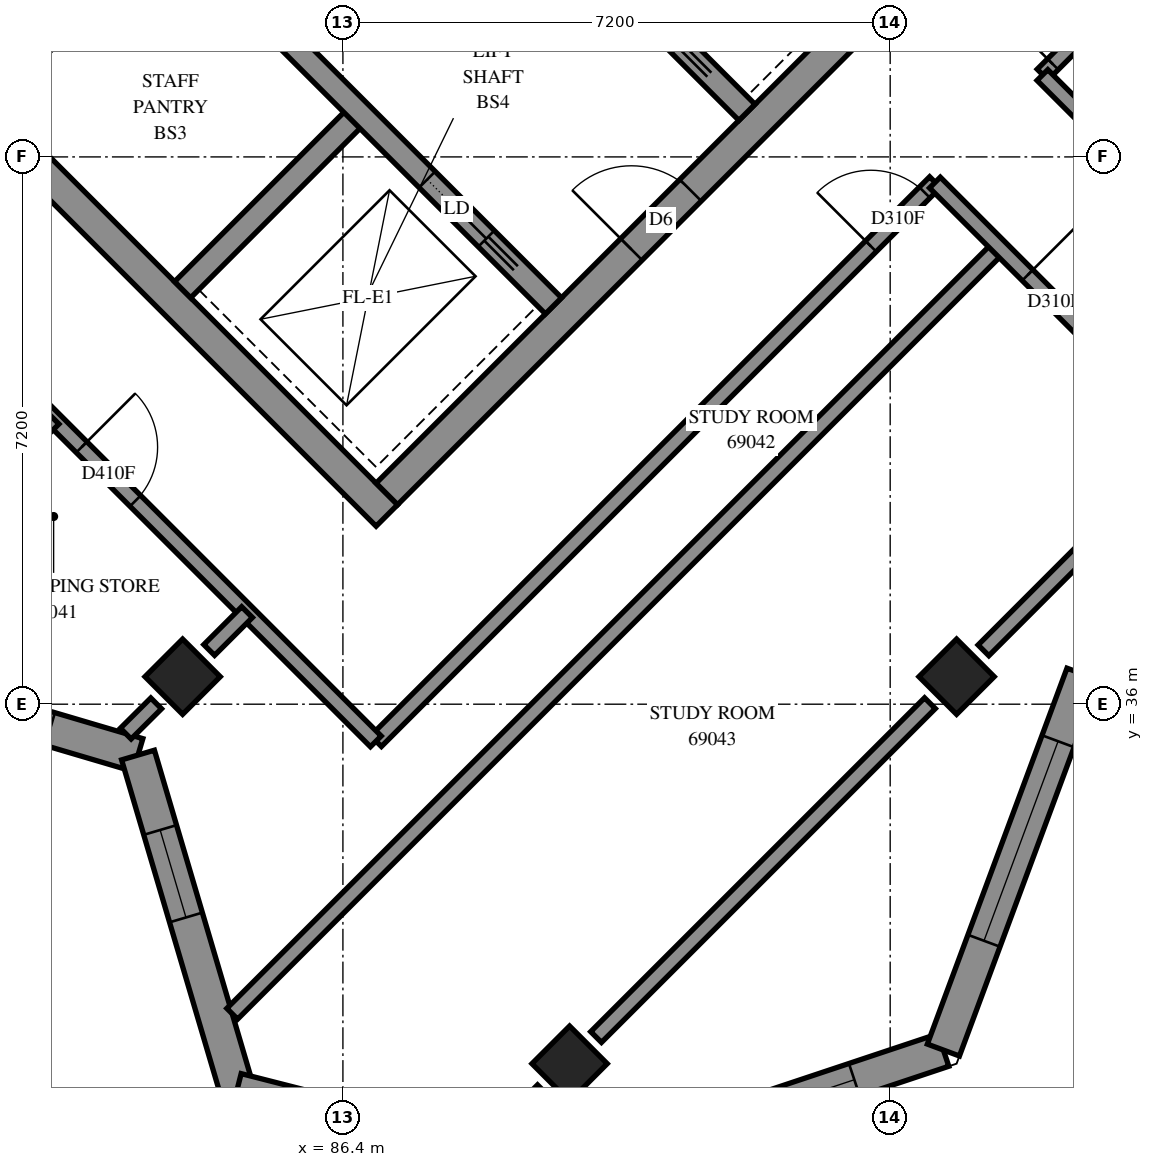
"""IFC4 building model, lengths in metres.
Left out: names, types, materials, properties, quantities, classifications, styles, units other than length and angle.
Written with IfcOpenShell. Run it as: python <this file> out.ifc"""

import sys

from ifc_helpers import new_model, si_unit, direction, frame, frame_2d, origin, origin_2d, place, context, subcontext, project, spatial, polyline, rectangle, outline, extrude, element, fill, save


model = new_model("IFC4")
c1 = context("Model", 3, precision=1e-05, world=origin(), true_north=direction((0.0, 1.0)))
c2 = subcontext(c1, "Body", "Model", "MODEL_VIEW")
j1 = project(units=[si_unit("LENGTHUNIT", "METRE"), si_unit("PLANEANGLEUNIT", "RADIAN")], contexts=[c1])
p1 = place(None, origin())
s1 = spatial("IfcSite", under=j1, at=p1, CompositionType="ELEMENT")
p2 = place(p1, origin())
s2 = spatial("IfcBuilding", under=s1, at=p2, CompositionType="ELEMENT")
p3 = place(p2, frame((0.0, 0.0, 254.0)))
s3 = spatial("IfcBuildingStorey", under=s2, at=p3, CompositionType="ELEMENT", Elevation=254.0)
for number, where, z_axis, x_axis in (
    (1, (84.291, 36.362, 0.0), (0.0, 0.0, 1.0), (0.707, -0.707, 0.0)),
    (2, (94.474, 36.362, 0.0), (0.0, 0.0, 1.0), (0.707, -0.707, 0.0)),
    (3, (89.382, 31.271, 0.0), (0.0, 0.0, 1.0), (0.707, -0.707, 0.0)),
):
    element("IfcColumn", number, at=place(p3, frame(where, z_axis=z_axis, x_axis=x_axis)), inside=s3, PredefinedType="COLUMN", context=c2, shape_type="SweptSolid", body=[
        extrude(rectangle(XDim=0.7, YDim=0.7, at=origin_2d()), origin(), (0.0, 0.0, 1.0), 3.1),
    ])
p4 = place(p3, frame((76.23, 49.231, -0.3), z_axis=(0.0, 0.0, 1.0), x_axis=(0.7071034917, -0.7071100706, 0.0)))
e4 = element("IfcWall", 4, at=p4, inside=s3, PredefinedType="SHEAR", context=c2, shape_type="SweptSolid", body=[
    extrude(rectangle(XDim=15.2, YDim=0.4, at=frame_2d((7.6, 0.0))), origin(), (0.0, 0.0, 1.0), 2.7),
])
p5 = place(p3, frame((86.978, 38.766, -0.3), z_axis=(0.0, 0.0, 1.0), x_axis=(0.7071067812, 0.7071067812, 0.0)))
e5 = element("IfcWall", 5, at=p5, inside=s3, PredefinedType="SHEAR", context=c2, shape_type="SweptSolid", body=[
    extrude(rectangle(XDim=14.4, YDim=0.4, at=frame_2d((7.2, 0.0))), origin(), (0.0, 0.0, 1.0), 2.7),
])
p6 = place(p5, frame((4.55, 0.0, 0.3)))
e6 = element("IfcOpeningElement", 6, at=p6, cuts=e5, PredefinedType="OPENING", context=c2, shape_type="SweptSolid", body=[
    extrude(rectangle(XDim=1.1, YDim=2.1, at=frame_2d((0.55, 1.05))), frame((0.0, 0.21, 0.0), z_axis=(0.0, -1.0, 0.0), x_axis=(1.0, 0.0, 0.0)), (0.0, 0.0, 1.0), 0.42),
])
p7 = place(p5, frame((11.35, 0.0, 0.3)))
e7 = element("IfcOpeningElement", 7, at=p7, cuts=e5, PredefinedType="OPENING", context=c2, shape_type="SweptSolid", body=[
    extrude(rectangle(XDim=1.1, YDim=2.1, at=frame_2d((0.55, 1.05))), frame((0.0, 0.21, 0.0), z_axis=(0.0, -1.0, 0.0), x_axis=(1.0, 0.0, 0.0)), (0.0, 0.0, 1.0), 0.42),
])
for number, where, z_axis, x_axis in (
    (8, (81.746, 43.999, 0.0), (0.0, 0.0, 1.0), (0.707, 0.707, 0.0)),
    (9, (84.291, 41.453, 0.0), (0.0, 0.0, 1.0), (0.707, 0.707, 0.0)),
):
    element("IfcWall", number, at=place(p3, frame(where, z_axis=z_axis, x_axis=x_axis)), inside=s3, PredefinedType="SOLIDWALL", context=c2, shape_type="SweptSolid", body=[
        extrude(rectangle(XDim=3.3, YDim=0.3, at=frame_2d((1.65, 0.0))), origin(), (0.0, 0.0, 1.0), 3.1),
    ])
p8 = place(p3, frame((78.988, 51.423, 0.0), z_axis=(0.0, 0.0, 1.0), x_axis=(0.7071067812, -0.7071067812, 0.0)))
e10 = element("IfcWall", 10, at=p8, inside=s3, PredefinedType="SOLIDWALL", context=c2, shape_type="SweptSolid", body=[
    extrude(rectangle(XDim=14.4, YDim=0.3, at=frame_2d((7.2, 0.0))), origin(), (0.0, 0.0, 1.0), 3.1),
])
p9 = place(p8, frame((1.35, 0.0, 0.0)))
e11 = element("IfcOpeningElement", 11, at=p9, cuts=e10, PredefinedType="OPENING", context=c2, shape_type="SweptSolid", body=[
    extrude(rectangle(XDim=0.9, YDim=2.1, at=frame_2d((0.45, 1.05))), frame((0.0, 0.16, 0.0), z_axis=(0.0, -1.0, 0.0), x_axis=(1.0, 0.0, 0.0)), (0.0, 0.0, 1.0), 0.32),
])
p10 = place(p8, frame((4.95, 0.0, 0.0)))
e12 = element("IfcOpeningElement", 12, at=p10, cuts=e10, PredefinedType="OPENING", context=c2, shape_type="SweptSolid", body=[
    extrude(rectangle(XDim=0.9, YDim=2.1, at=frame_2d((0.45, 1.05))), frame((0.0, 0.16, 0.0), z_axis=(0.0, -1.0, 0.0), x_axis=(1.0, 0.0, 0.0)), (0.0, 0.0, 1.0), 0.32),
])
p11 = place(p8, frame((8.55, 0.0, 0.0)))
e13 = element("IfcOpeningElement", 13, at=p11, cuts=e10, PredefinedType="OPENING", context=c2, shape_type="SweptSolid", body=[
    extrude(rectangle(XDim=0.9, YDim=2.1, at=frame_2d((0.45, 1.05))), frame((0.0, 0.16, 0.0), z_axis=(0.0, -1.0, 0.0), x_axis=(1.0, 0.0, 0.0)), (0.0, 0.0, 1.0), 0.32),
])
p12 = place(p8, frame((12.05, 0.0, 0.0)))
e14 = element("IfcOpeningElement", 14, at=p12, cuts=e10, PredefinedType="OPENING", context=c2, shape_type="SweptSolid", body=[
    extrude(rectangle(XDim=1.1, YDim=2.1, at=frame_2d((0.55, 1.05))), frame((0.0, 0.16, 0.0), z_axis=(0.0, -1.0, 0.0), x_axis=(1.0, 0.0, 0.0)), (0.0, 0.0, 1.0), 0.32),
])
p13 = place(p3, frame((81.534, 53.969, 0.0), z_axis=(0.0, 0.0, 1.0), x_axis=(0.707103309, -0.7071102534, 0.0)))
e15 = element("IfcWall", 15, at=p13, inside=s3, PredefinedType="SOLIDWALL", context=c2, shape_type="SweptSolid", body=[
    extrude(rectangle(XDim=14.4, YDim=0.3, at=frame_2d((7.2, 0.0))), origin(), (0.0, 0.0, 1.0), 3.1),
])
p14 = place(p13, frame((8.55, 0.0, 0.0)))
e16 = element("IfcOpeningElement", 16, at=p14, cuts=e15, PredefinedType="OPENING", context=c2, shape_type="SweptSolid", body=[
    extrude(rectangle(XDim=0.9, YDim=2.1, at=frame_2d((0.45, 1.05))), frame((0.0, 0.16, 0.0), z_axis=(0.0, -1.0, 0.0), x_axis=(1.0, 0.0, 0.0)), (0.0, 0.0, 1.0), 0.32),
])
p15 = place(p13, frame((1.25, 0.0, 0.0)))
e17 = element("IfcOpeningElement", 17, at=p15, cuts=e15, PredefinedType="OPENING", context=c2, shape_type="SweptSolid", body=[
    extrude(rectangle(XDim=1.1, YDim=2.1, at=frame_2d((0.55, 1.05))), frame((0.0, 0.16, 0.0), z_axis=(0.0, -1.0, 0.0), x_axis=(1.0, 0.0, 0.0)), (0.0, 0.0, 1.0), 0.32),
])
p16 = place(p13, frame((4.85, 0.0, 0.0)))
e18 = element("IfcOpeningElement", 18, at=p16, cuts=e15, PredefinedType="OPENING", context=c2, shape_type="SweptSolid", body=[
    extrude(rectangle(XDim=1.1, YDim=2.1, at=frame_2d((0.55, 1.05))), frame((0.0, 0.16, 0.0), z_axis=(0.0, -1.0, 0.0), x_axis=(1.0, 0.0, 0.0)), (0.0, 0.0, 1.0), 0.32),
])
p17 = place(p13, frame((12.05, 0.0, 0.0)))
e19 = element("IfcOpeningElement", 19, at=p17, cuts=e15, PredefinedType="OPENING", context=c2, shape_type="SweptSolid", body=[
    extrude(rectangle(XDim=1.1, YDim=2.1, at=frame_2d((0.55, 1.05))), frame((0.0, 0.16, 0.0), z_axis=(0.0, -1.0, 0.0), x_axis=(1.0, 0.0, 0.0)), (0.0, 0.0, 1.0), 0.32),
])
p18 = place(p3, frame((89.374, 29.808, 0.0), z_axis=(0.0, 0.0, 1.0), x_axis=(0.9486871496, 0.3162162112, 0.0)))
e20 = element("IfcWall", 20, at=p18, inside=s3, PredefinedType="SOLIDWALL", context=c2, shape_type="SweptSolid", body=[
    extrude(outline(polyline([(-0.066, -0.225), (5.301, -0.225), (5.085, 0.225), (0.066, 0.225), (-0.066, -0.225)])), origin(), (0.0, 0.0, 1.0), 3.1),
])
p19 = place(p18, frame((1.157, 0.0, 0.45)))
e21 = element("IfcOpeningElement", 21, at=p19, cuts=e20, PredefinedType="OPENING", context=c2, shape_type="SweptSolid", body=[
    extrude(rectangle(XDim=2.8, YDim=2.55, at=frame_2d((1.4, 1.275))), frame((0.0, 0.235, 0.0), z_axis=(0.0, -1.0, 0.0), x_axis=(1.0, 0.0, 0.0)), (0.0, 0.0, 1.0), 0.47),
])
p20 = place(p3, frame((94.3, 31.45, 0.0), z_axis=(0.0, 0.0, 1.0), x_axis=(0.3481927166, 0.9374229739, 0.0)))
e22 = element("IfcWall", 22, at=p20, inside=s3, PredefinedType="SOLIDWALL", context=c2, shape_type="SweptSolid", body=[
    extrude(outline(polyline([(-0.108, -0.225), (5.172, -0.225), (5.379, 0.225), (0.108, 0.225), (-0.108, -0.225)])), origin(), (0.0, 0.0, 1.0), 3.1),
])
p21 = place(p20, frame((1.534, 0.0, 0.45)))
e23 = element("IfcOpeningElement", 23, at=p21, cuts=e22, PredefinedType="OPENING", context=c2, shape_type="SweptSolid", body=[
    extrude(rectangle(XDim=2.8, YDim=2.55, at=frame_2d((1.4, 1.275))), frame((0.0, 0.235, 0.0), z_axis=(0.0, -1.0, 0.0), x_axis=(1.0, 0.0, 0.0)), (0.0, 0.0, 1.0), 0.47),
])
p22 = place(p3, frame((96.137, 36.395, 0.0), z_axis=(0.0, 0.0, 1.0), x_axis=(0.937429161, 0.3481760591, 0.0)))
e24 = element("IfcWall", 24, at=p22, inside=s3, PredefinedType="SOLIDWALL", context=c2, shape_type="SweptSolid", body=[
    extrude(outline(polyline([(0.103, -0.225), (5.383, -0.225), (5.168, 0.225), (-0.103, 0.225), (0.103, -0.225)])), origin(), (0.0, 0.0, 1.0), 3.1),
])
p23 = place(p22, frame((1.651, 0.0, 0.45)))
e25 = element("IfcOpeningElement", 25, at=p23, cuts=e24, PredefinedType="OPENING", context=c2, shape_type="SweptSolid", body=[
    extrude(rectangle(XDim=2.8, YDim=2.55, at=frame_2d((1.4, 1.275))), frame((0.0, 0.235, 0.0), z_axis=(0.0, -1.0, 0.0), x_axis=(1.0, 0.0, 0.0)), (0.0, 0.0, 1.0), 0.47),
])
p24 = place(p3, frame((79.295, 36.633, 0.0), z_axis=(0.0, 0.0, 1.0), x_axis=(0.959077868, -0.2831424432, 0.0)))
e26 = element("IfcWall", 26, at=p24, inside=s3, PredefinedType="SOLIDWALL", context=c2, shape_type="SweptSolid", body=[
    extrude(outline(polyline([(-0.128, -0.225), (4.475, -0.225), (4.72, 0.225), (0.128, 0.225), (-0.128, -0.225)])), origin(), (0.0, 0.0, 1.0), 3.1),
])
p25 = place(p24, frame((0.591, 0.0, 0.45)))
e27 = element("IfcOpeningElement", 27, at=p25, cuts=e26, PredefinedType="OPENING", context=c2, shape_type="SweptSolid", body=[
    extrude(rectangle(XDim=2.8, YDim=2.55, at=frame_2d((1.4, 1.275))), frame((0.0, 0.235, 0.0), z_axis=(0.0, -1.0, 0.0), x_axis=(1.0, 0.0, 0.0)), (0.0, 0.0, 1.0), 0.47),
])
p26 = place(p3, frame((83.704, 35.331, 0.0), z_axis=(0.0, 0.0, 1.0), x_axis=(0.2831424432, -0.959077868, 0.0)))
e28 = element("IfcWall", 28, at=p26, inside=s3, PredefinedType="SOLIDWALL", context=c2, shape_type="SweptSolid", body=[
    extrude(outline(polyline([(0.122, -0.225), (4.725, -0.225), (4.469, 0.225), (-0.122, 0.225), (0.122, -0.225)])), origin(), (0.0, 0.0, 1.0), 3.1),
])
p27 = place(p26, frame((1.028, 0.0, 0.45)))
e29 = element("IfcOpeningElement", 29, at=p27, cuts=e28, PredefinedType="OPENING", context=c2, shape_type="SweptSolid", body=[
    extrude(rectangle(XDim=1.2, YDim=2.55, at=frame_2d((0.6, 1.275))), frame((0.0, 0.235, 0.0), z_axis=(0.0, -1.0, 0.0), x_axis=(1.0, 0.0, 0.0)), (0.0, 0.0, 1.0), 0.47),
])
p28 = place(p3, frame((85.006, 30.922, 0.0), z_axis=(0.0, 0.0, 1.0), x_axis=(0.9689925633, -0.2470898869, 0.0)))
e30 = element("IfcWall", 30, at=p28, inside=s3, PredefinedType="SOLIDWALL", context=c2, shape_type="SweptSolid", body=[
    extrude(outline(polyline([(-0.128, -0.225), (4.574, -0.225), (4.442, 0.225), (0.128, 0.225), (-0.128, -0.225)])), origin(), (0.0, 0.0, 1.0), 3.1),
])
p29 = place(p28, frame((2.14, 0.0, 0.45)))
e31 = element("IfcOpeningElement", 31, at=p29, cuts=e30, PredefinedType="OPENING", context=c2, shape_type="SweptSolid", body=[
    extrude(rectangle(XDim=1.2, YDim=2.55, at=frame_2d((0.6, 1.275))), frame((0.0, 0.235, 0.0), z_axis=(0.0, -1.0, 0.0), x_axis=(1.0, 0.0, 0.0)), (0.0, 0.0, 1.0), 0.47),
])
p30 = place(p3, frame((84.944, 31.927, 0.0), z_axis=(0.0, 0.0, 1.0), x_axis=(0.7071768334, 0.7070367221, 0.0)))
e32 = element("IfcWall", 32, at=p30, inside=s3, PredefinedType="PARTITIONING", context=c2, shape_type="SweptSolid", body=[
    extrude(rectangle(XDim=14.274, YDim=0.2, at=frame_2d((7.137, 0.0))), origin(), (0.0, 0.0, 1.0), 3.1),
])
p31 = place(p3, frame((86.836, 35.514, 0.0), z_axis=(0.0, 0.0, 1.0), x_axis=(0.7071067812, 0.7071067812, 0.0)))
e33 = element("IfcWall", 33, at=p31, inside=s3, PredefinedType="PARTITIONING", context=c2, shape_type="SweptSolid", body=[
    extrude(rectangle(XDim=10.4, YDim=0.2, at=frame_2d((5.2, 0.0))), origin(), (0.0, 0.0, 1.0), 3.1),
])
p32 = place(p31, frame((9.207, 0.0, 0.0)))
e34 = element("IfcOpeningElement", 34, at=p32, cuts=e33, PredefinedType="OPENING", context=c2, shape_type="SweptSolid", body=[
    extrude(rectangle(XDim=1.0, YDim=2.1, at=frame_2d((0.5, 1.05))), frame((0.0, 0.11, 0.0), z_axis=(0.0, -1.0, 0.0), x_axis=(1.0, 0.0, 0.0)), (0.0, 0.0, 1.0), 0.22),
])
p33 = place(p3, frame((80.747, 41.597, 0.0), z_axis=(0.0, 0.0, 1.0), x_axis=(0.7071067812, -0.7071067812, 0.0)))
e35 = element("IfcWall", 35, at=p33, inside=s3, PredefinedType="PARTITIONING", context=c2, shape_type="SweptSolid", body=[
    extrude(rectangle(XDim=8.607, YDim=0.2, at=frame_2d((4.303, 0.0))), origin(), (0.0, 0.0, 1.0), 3.1),
])
p34 = place(p33, frame((0.195, 0.0, 0.0)))
e36 = element("IfcOpeningElement", 36, at=p34, cuts=e35, PredefinedType="OPENING", context=c2, shape_type="SweptSolid", body=[
    extrude(rectangle(XDim=1.0, YDim=2.1, at=frame_2d((0.5, 1.05))), frame((0.0, 0.11, 0.0), z_axis=(0.0, -1.0, 0.0), x_axis=(1.0, 0.0, 0.0)), (0.0, 0.0, 1.0), 0.22),
])
p35 = place(p33, frame((3.133, 0.0, 0.0)))
e37 = element("IfcOpeningElement", 37, at=p35, cuts=e35, PredefinedType="OPENING", context=c2, shape_type="SweptSolid", body=[
    extrude(rectangle(XDim=1.0, YDim=2.1, at=frame_2d((0.5, 1.05))), frame((0.0, 0.11, 0.0), z_axis=(0.0, -1.0, 0.0), x_axis=(1.0, 0.0, 0.0)), (0.0, 0.0, 1.0), 0.22),
])
p36 = place(p3, frame((95.605, 44.283, 0.0), z_axis=(0.0, 0.0, 1.0), x_axis=(0.7071067812, 0.7071067812, 0.0)))
e38 = element("IfcWall", 38, at=p36, inside=s3, PredefinedType="PARTITIONING", context=c2, shape_type="SweptSolid", body=[
    extrude(rectangle(XDim=6.8, YDim=0.2, at=frame_2d((3.4, 0.0))), origin(), (0.0, 0.0, 1.0), 3.1),
])
p37 = place(p36, frame((0.193, 0.0, 0.0)))
e39 = element("IfcOpeningElement", 39, at=p37, cuts=e38, PredefinedType="OPENING", context=c2, shape_type="SweptSolid", body=[
    extrude(rectangle(XDim=1.0, YDim=2.1, at=frame_2d((0.5, 1.05))), frame((0.0, 0.11, 0.0), z_axis=(0.0, -1.0, 0.0), x_axis=(1.0, 0.0, 0.0)), (0.0, 0.0, 1.0), 0.22),
])
p38 = place(p3, frame((89.731, 31.621, 0.0), z_axis=(0.0, 0.0, 1.0), x_axis=(0.7071067812, 0.7071067812, 0.0)))
e40 = element("IfcWall", 40, at=p38, inside=s3, PredefinedType="PARTITIONING", context=c2, shape_type="SweptSolid", body=[
    extrude(rectangle(XDim=6.211, YDim=0.2, at=frame_2d((3.106, 0.0))), origin(), (0.0, 0.0, 1.0), 2.6),
])
p39 = place(p3, frame((95.603, 44.277, 0.0), z_axis=(0.0, 0.0, 1.0), x_axis=(0.7071067812, -0.7071067812, 0.0)))
e41 = element("IfcWall", 41, at=p39, inside=s3, PredefinedType="PARTITIONING", context=c2, shape_type="SweptSolid", body=[
    extrude(rectangle(XDim=4.797, YDim=0.2, at=frame_2d((2.398, 0.0))), origin(), (0.0, 0.0, 1.0), 3.1),
])
p40 = place(p39, frame((1.723, 0.0, 0.0)))
e42 = element("IfcOpeningElement", 42, at=p40, cuts=e41, PredefinedType="OPENING", context=c2, shape_type="SweptSolid", body=[
    extrude(rectangle(XDim=1.0, YDim=2.1, at=frame_2d((0.5, 1.05))), frame((0.0, 0.11, 0.0), z_axis=(0.0, -1.0, 0.0), x_axis=(1.0, 0.0, 0.0)), (0.0, 0.0, 1.0), 0.22),
])
p41 = place(p3, frame((94.189, 42.863, 0.0), z_axis=(0.0, 0.0, 1.0), x_axis=(0.7071067812, -0.7071067812, 0.0)))
e43 = element("IfcWall", 43, at=p41, inside=s3, PredefinedType="PARTITIONING", context=c2, shape_type="SweptSolid", body=[
    extrude(rectangle(XDim=4.797, YDim=0.2, at=frame_2d((2.398, 0.0))), origin(), (0.0, 0.0, 1.0), 3.1),
])
p42 = place(p41, frame((1.723, 0.0, 0.0)))
e44 = element("IfcOpeningElement", 44, at=p42, cuts=e43, PredefinedType="OPENING", context=c2, shape_type="SweptSolid", body=[
    extrude(rectangle(XDim=1.0, YDim=2.1, at=frame_2d((0.5, 1.05))), frame((0.0, 0.11, 0.0), z_axis=(0.0, -1.0, 0.0), x_axis=(1.0, 0.0, 0.0)), (0.0, 0.0, 1.0), 0.22),
])
p43 = place(p3, frame((79.611, 36.774, 0.0), z_axis=(0.0, 0.0, 1.0), x_axis=(0.7071186348, 0.7070949274, 0.0)))
e45 = element("IfcWall", 45, at=p43, inside=s3, PredefinedType="PARTITIONING", context=c2, shape_type="SweptSolid", body=[
    extrude(rectangle(XDim=4.218, YDim=0.2, at=frame_2d((2.109, 0.0))), origin(), (0.0, 0.0, 1.0), 3.1),
])
p44 = place(p3, frame((94.828, 36.709, 0.0), z_axis=(0.0, 0.0, 1.0), x_axis=(0.7068506295, 0.7073628401, 0.0)))
e46 = element("IfcWall", 46, at=p44, inside=s3, PredefinedType="PARTITIONING", context=c2, shape_type="SweptSolid", body=[
    extrude(rectangle(XDim=3.905, YDim=0.2, at=frame_2d((1.952, 0.0))), origin(), (0.0, 0.0, 1.0), 2.6),
])
p45 = place(p3, frame((88.399, 30.289, 0.0), z_axis=(0.0, 0.0, 1.0), x_axis=(0.7071067812, 0.7071067812, 0.0)))
e47 = element("IfcWall", 47, at=p45, inside=s3, PredefinedType="PARTITIONING", context=c2, shape_type="SweptSolid", body=[
    extrude(rectangle(XDim=0.894, YDim=0.2, at=frame_2d((0.447, 0.0))), origin(), (0.0, 0.0, 1.0), 3.1),
])
p46 = place(p3, frame((84.641, 36.713, 0.0), z_axis=(0.0, 0.0, 1.0), x_axis=(0.7071067812, 0.7071067812, 0.0)))
e48 = element("IfcWall", 48, at=p46, inside=s3, PredefinedType="PARTITIONING", context=c2, shape_type="SweptSolid", body=[
    extrude(rectangle(XDim=0.704, YDim=0.2, at=frame_2d((0.352, 0.0))), origin(), (0.0, 0.0, 1.0), 3.1),
])
p47 = place(p3, frame((83.543, 35.613, 0.0), z_axis=(0.0, 0.0, 1.0), x_axis=(0.7092312739, 0.7049758862, 0.0)))
e49 = element("IfcWall", 49, at=p47, inside=s3, PredefinedType="PARTITIONING", context=c2, shape_type="SweptSolid", body=[
    extrude(rectangle(XDim=0.564, YDim=0.2, at=frame_2d((0.282, 0.0))), origin(), (0.0, 0.0, 1.0), 3.1),
])
p48 = place(p19, origin())
e50 = element("IfcWindow", 50, at=p48, inside=s3, PartitioningType="SINGLE_PANEL", PredefinedType="WINDOW", context=c2, shape_type="SweptSolid", body=[
    extrude(rectangle(XDim=2.8, YDim=2.55, at=frame_2d((1.4, 1.275))), frame((0.0, 0.205, 0.0), z_axis=(0.0, -1.0, 0.0), x_axis=(1.0, 0.0, 0.0)), (0.0, 0.0, 1.0), 0.06),
])
fill(e21, e50)
p49 = place(p21, origin())
e51 = element("IfcWindow", 51, at=p49, inside=s3, PartitioningType="SINGLE_PANEL", PredefinedType="WINDOW", context=c2, shape_type="SweptSolid", body=[
    extrude(rectangle(XDim=2.8, YDim=2.55, at=frame_2d((1.4, 1.275))), frame((0.0, 0.205, 0.0), z_axis=(0.0, -1.0, 0.0), x_axis=(1.0, 0.0, 0.0)), (0.0, 0.0, 1.0), 0.06),
])
fill(e23, e51)
p50 = place(p25, origin())
e52 = element("IfcWindow", 52, at=p50, inside=s3, PartitioningType="SINGLE_PANEL", PredefinedType="WINDOW", context=c2, shape_type="SweptSolid", body=[
    extrude(rectangle(XDim=2.8, YDim=2.55, at=frame_2d((1.4, 1.275))), frame((0.0, 0.205, 0.0), z_axis=(0.0, -1.0, 0.0), x_axis=(1.0, 0.0, 0.0)), (0.0, 0.0, 1.0), 0.06),
])
fill(e27, e52)
p51 = place(p27, origin())
e53 = element("IfcWindow", 53, at=p51, inside=s3, PartitioningType="SINGLE_PANEL", PredefinedType="WINDOW", context=c2, shape_type="SweptSolid", body=[
    extrude(rectangle(XDim=1.2, YDim=2.55, at=frame_2d((0.6, 1.275))), frame((0.0, 0.205, 0.0), z_axis=(0.0, -1.0, 0.0), x_axis=(1.0, 0.0, 0.0)), (0.0, 0.0, 1.0), 0.06),
])
fill(e29, e53)
p52 = place(p6, origin())
e54 = element("IfcDoor", 54, at=p52, inside=s3, OperationType="DOUBLE_DOOR_SINGLE_SWING", PredefinedType="DOOR", context=c2, shape_type="SweptSolid", body=[
    extrude(rectangle(XDim=1.1, YDim=2.1, at=frame_2d((0.55, 1.05))), frame((0.0, 0.025, 0.0), z_axis=(0.0, -1.0, 0.0), x_axis=(1.0, 0.0, 0.0)), (0.0, 0.0, 1.0), 0.05),
])
fill(e6, e54)
p53 = place(p12, origin())
e55 = element("IfcDoor", 55, at=p53, inside=s3, OperationType="SLIDING_TO_RIGHT", PredefinedType="DOOR", context=c2, shape_type="SweptSolid", body=[
    extrude(rectangle(XDim=1.1, YDim=2.1, at=frame_2d((0.55, 1.05))), frame((0.0, 0.025, 0.0), z_axis=(0.0, -1.0, 0.0), x_axis=(1.0, 0.0, 0.0)), (0.0, 0.0, 1.0), 0.05),
])
fill(e14, e55)
p54 = place(p37, origin())
e56 = element("IfcDoor", 56, at=p54, inside=s3, OperationType="SINGLE_SWING_LEFT", PredefinedType="DOOR", context=c2, shape_type="SweptSolid", body=[
    extrude(rectangle(XDim=1.0, YDim=2.1, at=frame_2d((0.5, 1.05))), frame((0.0, 0.025, 0.0), z_axis=(0.0, -1.0, 0.0), x_axis=(1.0, 0.0, 0.0)), (0.0, 0.0, 1.0), 0.05),
])
fill(e39, e56)
p55 = place(p35, origin())
e57 = element("IfcDoor", 57, at=p55, inside=s3, OperationType="SINGLE_SWING_LEFT", PredefinedType="DOOR", context=c2, shape_type="SweptSolid", body=[
    extrude(rectangle(XDim=1.0, YDim=2.1, at=frame_2d((0.5, 1.05))), frame((0.0, 0.025, 0.0), z_axis=(0.0, -1.0, 0.0), x_axis=(1.0, 0.0, 0.0)), (0.0, 0.0, 1.0), 0.05),
])
fill(e37, e57)
p56 = place(p32, origin())
e58 = element("IfcDoor", 58, at=p56, inside=s3, OperationType="SINGLE_SWING_RIGHT", PredefinedType="DOOR", context=c2, shape_type="SweptSolid", body=[
    extrude(rectangle(XDim=1.0, YDim=2.1, at=frame_2d((0.5, 1.05))), frame((0.0, 0.025, 0.0), z_axis=(0.0, -1.0, 0.0), x_axis=(1.0, 0.0, 0.0)), (0.0, 0.0, 1.0), 0.05),
])
fill(e34, e58)
p57 = place(p42, origin())
e59 = element("IfcDoor", 59, at=p57, inside=s3, OperationType="SINGLE_SWING_LEFT", PredefinedType="DOOR", context=c2, shape_type="SweptSolid", body=[
    extrude(rectangle(XDim=1.0, YDim=2.1, at=frame_2d((0.5, 1.05))), frame((0.0, 0.025, 0.0), z_axis=(0.0, -1.0, 0.0), x_axis=(1.0, 0.0, 0.0)), (0.0, 0.0, 1.0), 0.05),
])
fill(e44, e59)
save(model, sys.argv[1])
